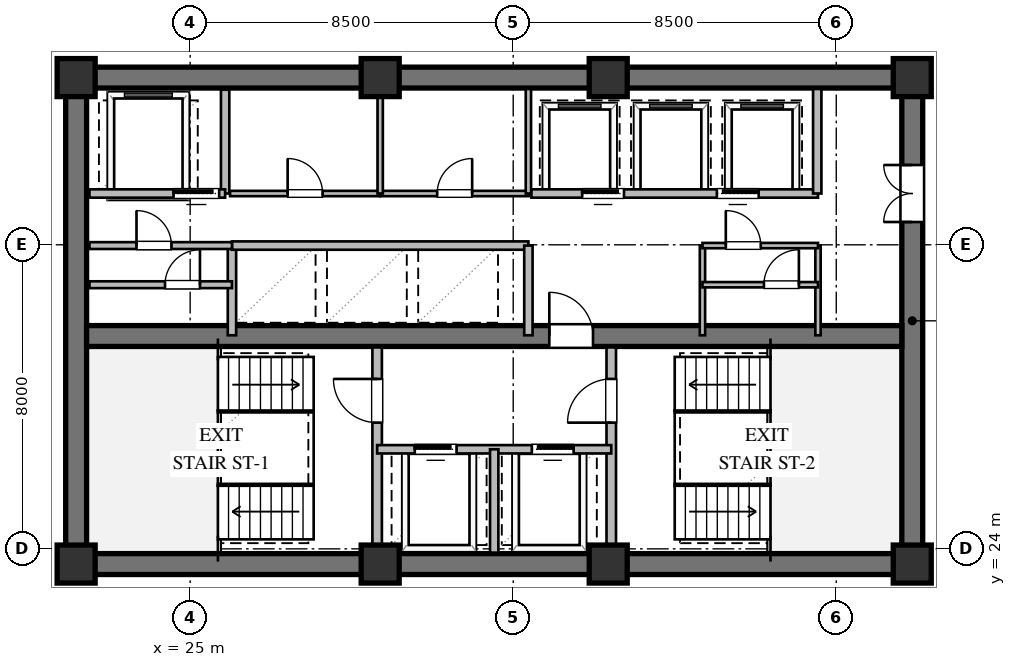
"""IFC4 building model, lengths in metres.
Left out: names, types, materials, properties, quantities, classifications, styles, units other than length and angle.
Written with IfcOpenShell. Run it as: python <this file> out.ifc"""

import sys

from ifc_helpers import new_model, si_unit, direction, frame, frame_2d, origin, origin_2d, place, context, subcontext, project, spatial, rectangle, extrude, element, fill, save


model = new_model("IFC4")
c1 = context("Model", 3, precision=1e-05, world=origin(), true_north=direction((0.0, 1.0)))
c2 = subcontext(c1, "Body", "Model", "MODEL_VIEW")
j1 = project(units=[si_unit("LENGTHUNIT", "METRE"), si_unit("PLANEANGLEUNIT", "RADIAN")], contexts=[c1])
p1 = place(None, origin())
s1 = spatial("IfcSite", under=j1, at=p1, CompositionType="ELEMENT")
p2 = place(p1, origin())
s2 = spatial("IfcBuilding", under=s1, at=p2, CompositionType="ELEMENT")
p3 = place(p2, frame((0.0, 0.0, 178.2)))
s3 = spatial("IfcBuildingStorey", under=s2, at=p3, CompositionType="ELEMENT", Elevation=178.2)
for number, where, z_axis, x_axis in (
    (1, (21.725, 23.6, 0.0), (0.0, 0.0, 1.0), (1.0, 0.0, 0.0)),
    (2, (21.725, 36.4, 0.0), (0.0, 0.0, 1.0), (1.0, 0.0, 0.0)),
):
    element("IfcWall", number, at=place(p3, frame(where, z_axis=z_axis, x_axis=x_axis)), inside=s3, PredefinedType="SHEAR", context=c2, shape_type="SweptSolid", body=[
        extrude(rectangle(XDim=22.55, YDim=0.55, at=frame_2d((11.275, 0.0))), origin(), (0.0, 0.0, 1.0), 3.28),
    ])
p4 = place(p3, frame((22.0, 23.875, 0.0), z_axis=(0.0, 0.0, 1.0), x_axis=(0.0, 1.0, 0.0)))
e3 = element("IfcWall", 3, at=p4, inside=s3, PredefinedType="SHEAR", context=c2, shape_type="SweptSolid", body=[
    extrude(rectangle(XDim=12.25, YDim=0.55, at=frame_2d((6.125, 0.0))), origin(), (0.0, 0.0, 1.0), 3.28),
])
p5 = place(p3, frame((44.0, 23.875, 0.0), z_axis=(0.0, 0.0, 1.0), x_axis=(0.0, 1.0, 0.0)))
e4 = element("IfcWall", 4, at=p5, inside=s3, PredefinedType="SHEAR", context=c2, shape_type="SweptSolid", body=[
    extrude(rectangle(XDim=12.25, YDim=0.55, at=frame_2d((6.125, 0.0))), origin(), (0.0, 0.0, 1.0), 3.28),
])
p6 = place(p5, frame((8.725, 0.0, 0.0)))
e5 = element("IfcOpeningElement", 5, at=p6, cuts=e4, PredefinedType="OPENING", context=c2, shape_type="SweptSolid", body=[
    extrude(rectangle(XDim=1.5, YDim=2.15, at=frame_2d((0.75, 1.075))), frame((0.0, 0.285, 0.0), z_axis=(0.0, -1.0, 0.0), x_axis=(1.0, 0.0, 0.0)), (0.0, 0.0, 1.0), 0.57),
])
p7 = place(p3, frame((22.275, 29.6, 0.0), z_axis=(0.0, 0.0, 1.0), x_axis=(1.0, 0.0, 0.0)))
e6 = element("IfcWall", 6, at=p7, inside=s3, PredefinedType="SHEAR", context=c2, shape_type="SweptSolid", body=[
    extrude(rectangle(XDim=21.45, YDim=0.55, at=frame_2d((10.725, 0.0))), origin(), (0.0, 0.0, 1.0), 3.28),
])
p8 = place(p7, frame((12.175, 0.0, 0.0)))
e7 = element("IfcOpeningElement", 7, at=p8, cuts=e6, PredefinedType="OPENING", context=c2, shape_type="SweptSolid", body=[
    extrude(rectangle(XDim=1.15, YDim=2.1, at=frame_2d((0.575, 1.05))), frame((0.0, 0.285, 0.0), z_axis=(0.0, -1.0, 0.0), x_axis=(1.0, 0.0, 0.0)), (0.0, 0.0, 1.0), 0.57),
])
for number, where, z_axis, x_axis in (
    (8, (22.0, 23.6, 0.0), (0.0, 0.0, 1.0), (1.0, 0.0, 0.0)),
    (9, (30.0, 23.6, 0.0), (0.0, 0.0, 1.0), (1.0, 0.0, 0.0)),
    (10, (36.0, 23.6, 0.0), (0.0, 0.0, 1.0), (1.0, 0.0, 0.0)),
    (11, (44.0, 23.6, 0.0), (0.0, 0.0, 1.0), (1.0, 0.0, 0.0)),
    (12, (44.0, 36.4, 0.0), (0.0, 0.0, 1.0), (1.0, 0.0, 0.0)),
    (13, (36.0, 36.4, 0.0), (0.0, 0.0, 1.0), (1.0, 0.0, 0.0)),
    (14, (30.0, 36.4, 0.0), (0.0, 0.0, 1.0), (1.0, 0.0, 0.0)),
    (15, (22.0, 36.4, 0.0), (0.0, 0.0, 1.0), (1.0, 0.0, 0.0)),
):
    element("IfcColumn", number, at=place(p3, frame(where, z_axis=z_axis, x_axis=x_axis)), inside=s3, PredefinedType="COLUMN", context=c2, shape_type="SweptSolid", body=[
        extrude(rectangle(XDim=1.0, YDim=1.0, at=origin_2d()), origin(), (0.0, 0.0, 1.0), 3.6),
    ])
p9 = place(p3, frame((29.92, 23.9, 0.0), z_axis=(0.0, 0.0, 1.0), x_axis=(0.0, 1.0, 0.0)))
e16 = element("IfcWall", 16, at=p9, inside=s3, PredefinedType="SOLIDWALL", context=c2, shape_type="SweptSolid", body=[
    extrude(rectangle(XDim=5.4, YDim=0.25, at=frame_2d((2.7, 0.0))), origin(), (0.0, 0.0, 1.0), 2.81),
])
p10 = place(p9, frame((3.421, 0.0, 0.0)))
e17 = element("IfcOpeningElement", 17, at=p10, cuts=e16, PredefinedType="OPENING", context=c2, shape_type="SweptSolid", body=[
    extrude(rectangle(XDim=1.15, YDim=2.1, at=frame_2d((0.575, 1.05))), frame((0.0, 0.135, 0.0), z_axis=(0.0, -1.0, 0.0), x_axis=(1.0, 0.0, 0.0)), (0.0, 0.0, 1.0), 0.27),
])
p11 = place(p3, frame((36.08, 23.9, 0.0), z_axis=(0.0, 0.0, 1.0), x_axis=(0.0, 1.0, 0.0)))
e18 = element("IfcWall", 18, at=p11, inside=s3, PredefinedType="SOLIDWALL", context=c2, shape_type="SweptSolid", body=[
    extrude(rectangle(XDim=5.4, YDim=0.25, at=frame_2d((2.7, 0.0))), origin(), (0.0, 0.0, 1.0), 3.28),
])
p12 = place(p11, frame((3.421, 0.0, 0.0)))
e19 = element("IfcOpeningElement", 19, at=p12, cuts=e18, PredefinedType="OPENING", context=c2, shape_type="SweptSolid", body=[
    extrude(rectangle(XDim=1.15, YDim=2.1, at=frame_2d((0.575, 1.05))), frame((0.0, 0.135, 0.0), z_axis=(0.0, -1.0, 0.0), x_axis=(1.0, 0.0, 0.0)), (0.0, 0.0, 1.0), 0.27),
])
p13 = place(p3, frame((29.92, 26.62, 0.0), z_axis=(0.0, 0.0, 1.0), x_axis=(1.0, 0.0, 0.0)))
e20 = element("IfcWall", 20, at=p13, inside=s3, PredefinedType="SOLIDWALL", context=c2, shape_type="SweptSolid", body=[
    extrude(rectangle(XDim=6.16, YDim=0.22, at=frame_2d((3.08, 0.0))), origin(), (0.0, 0.0, 1.0), 3.28),
])
p14 = place(p13, frame((0.99, 0.0, 0.0)))
e21 = element("IfcOpeningElement", 21, at=p14, cuts=e20, PredefinedType="OPENING", context=c2, shape_type="SweptSolid", body=[
    extrude(rectangle(XDim=1.1, YDim=2.1, at=frame_2d((0.55, 1.05))), frame((0.0, 0.12, 0.0), z_axis=(0.0, -1.0, 0.0), x_axis=(1.0, 0.0, 0.0)), (0.0, 0.0, 1.0), 0.24),
])
p15 = place(p13, frame((4.07, 0.0, 0.0)))
e22 = element("IfcOpeningElement", 22, at=p15, cuts=e20, PredefinedType="OPENING", context=c2, shape_type="SweptSolid", body=[
    extrude(rectangle(XDim=1.1, YDim=2.1, at=frame_2d((0.55, 1.05))), frame((0.0, 0.12, 0.0), z_axis=(0.0, -1.0, 0.0), x_axis=(1.0, 0.0, 0.0)), (0.0, 0.0, 1.0), 0.24),
])
p16 = place(p3, frame((33.0, 23.9, 0.0), z_axis=(0.0, 0.0, 1.0), x_axis=(0.0, 1.0, 0.0)))
e23 = element("IfcWall", 23, at=p16, inside=s3, PredefinedType="SOLIDWALL", context=c2, shape_type="SweptSolid", body=[
    extrude(rectangle(XDim=2.72, YDim=0.22, at=frame_2d((1.36, 0.0))), origin(), (0.0, 0.0, 1.0), 3.28),
])
p17 = place(p3, frame((25.92, 33.35, 0.0), z_axis=(0.0, 0.0, 1.0), x_axis=(0.0, 1.0, 0.0)))
e24 = element("IfcWall", 24, at=p17, inside=s3, PredefinedType="SOLIDWALL", context=c2, shape_type="SweptSolid", body=[
    extrude(rectangle(XDim=2.73, YDim=0.22, at=frame_2d((1.365, 0.0))), origin(), (0.0, 0.0, 1.0), 3.28),
])
p18 = place(p3, frame((22.35, 33.35, 0.0), z_axis=(0.0, 0.0, 1.0), x_axis=(1.0, 0.0, 0.0)))
e25 = element("IfcWall", 25, at=p18, inside=s3, PredefinedType="SOLIDWALL", context=c2, shape_type="SweptSolid", body=[
    extrude(rectangle(XDim=3.57, YDim=0.22, at=frame_2d((1.785, 0.0))), origin(), (0.0, 0.0, 1.0), 3.28),
])
p19 = place(p18, frame((2.213, 0.0, 0.0)))
e26 = element("IfcOpeningElement", 26, at=p19, cuts=e25, PredefinedType="OPENING", context=c2, shape_type="SweptSolid", body=[
    extrude(rectangle(XDim=1.2, YDim=2.1, at=frame_2d((0.6, 1.05))), frame((0.0, 0.12, 0.0), z_axis=(0.0, -1.0, 0.0), x_axis=(1.0, 0.0, 0.0)), (0.0, 0.0, 1.0), 0.24),
])
p20 = place(p3, frame((26.1, 29.62, 0.0), z_axis=(0.0, 0.0, 1.0), x_axis=(0.0, 1.0, 0.0)))
e27 = element("IfcWall", 27, at=p20, inside=s3, PredefinedType="SOLIDWALL", context=c2, shape_type="SweptSolid", body=[
    extrude(rectangle(XDim=2.36, YDim=0.22, at=frame_2d((1.18, 0.0))), origin(), (0.0, 0.0, 1.0), 3.28),
])
p21 = place(p3, frame((26.1, 31.98, 0.0), z_axis=(0.0, 0.0, 1.0), x_axis=(1.0, 0.0, 0.0)))
e28 = element("IfcWall", 28, at=p21, inside=s3, PredefinedType="SOLIDWALL", context=c2, shape_type="SweptSolid", body=[
    extrude(rectangle(XDim=7.8, YDim=0.22, at=frame_2d((3.9, 0.0))), origin(), (0.0, 0.0, 1.0), 3.28),
])
p22 = place(p3, frame((33.9, 29.62, 0.0), z_axis=(0.0, 0.0, 1.0), x_axis=(0.0, 1.0, 0.0)))
e29 = element("IfcWall", 29, at=p22, inside=s3, PredefinedType="SOLIDWALL", context=c2, shape_type="SweptSolid", body=[
    extrude(rectangle(XDim=2.36, YDim=0.22, at=frame_2d((1.18, 0.0))), origin(), (0.0, 0.0, 1.0), 3.28),
])
p23 = place(p3, frame((26.05, 33.35, 0.0), z_axis=(0.0, 0.0, 1.0), x_axis=(1.0, 0.0, 0.0)))
e30 = element("IfcWall", 30, at=p23, inside=s3, PredefinedType="PARTITIONING", context=c2, shape_type="SweptSolid", body=[
    extrude(rectangle(XDim=3.95, YDim=0.14, at=frame_2d((1.975, 0.0))), origin(), (0.0, 0.0, 1.0), 3.28),
])
p24 = place(p23, frame((1.515, 0.0, 0.0)))
e31 = element("IfcOpeningElement", 31, at=p24, cuts=e30, PredefinedType="OPENING", context=c2, shape_type="SweptSolid", body=[
    extrude(rectangle(XDim=0.92, YDim=2.1, at=frame_2d((0.46, 1.05))), frame((0.0, 0.08, 0.0), z_axis=(0.0, -1.0, 0.0), x_axis=(1.0, 0.0, 0.0)), (0.0, 0.0, 1.0), 0.16),
])
p25 = place(p3, frame((30.0, 33.35, 0.0), z_axis=(0.0, 0.0, 1.0), x_axis=(1.0, 0.0, 0.0)))
e32 = element("IfcWall", 32, at=p25, inside=s3, PredefinedType="PARTITIONING", context=c2, shape_type="SweptSolid", body=[
    extrude(rectangle(XDim=3.92, YDim=0.14, at=frame_2d((1.96, 0.0))), origin(), (0.0, 0.0, 1.0), 3.28),
])
p26 = place(p25, frame((1.5, 0.0, 0.0)))
e33 = element("IfcOpeningElement", 33, at=p26, cuts=e32, PredefinedType="OPENING", context=c2, shape_type="SweptSolid", body=[
    extrude(rectangle(XDim=0.92, YDim=2.1, at=frame_2d((0.46, 1.05))), frame((0.0, 0.08, 0.0), z_axis=(0.0, -1.0, 0.0), x_axis=(1.0, 0.0, 0.0)), (0.0, 0.0, 1.0), 0.16),
])
for number, where, z_axis, x_axis in (
    (34, (30.0, 33.35, 0.0), (0.0, 0.0, 1.0), (0.0, 1.0, 0.0)),
    (35, (33.9, 33.35, 0.0), (0.0, 0.0, 1.0), (0.0, 1.0, 0.0)),
):
    element("IfcWall", number, at=place(p3, frame(where, z_axis=z_axis, x_axis=x_axis)), inside=s3, PredefinedType="PARTITIONING", context=c2, shape_type="SweptSolid", body=[
        extrude(rectangle(XDim=2.75, YDim=0.14, at=frame_2d((1.375, 0.0))), origin(), (0.0, 0.0, 1.0), 3.28),
    ])
p27 = place(p3, frame((33.98, 33.35, 0.0), z_axis=(0.0, 0.0, 1.0), x_axis=(1.0, 0.0, 0.0)))
e36 = element("IfcWall", 36, at=p27, inside=s3, PredefinedType="SOLIDWALL", context=c2, shape_type="SweptSolid", body=[
    extrude(rectangle(XDim=7.54, YDim=0.22, at=frame_2d((3.77, 0.0))), origin(), (0.0, 0.0, 1.0), 3.28),
])
p28 = place(p27, frame((1.335, 0.0, 0.0)))
e37 = element("IfcOpeningElement", 37, at=p28, cuts=e36, PredefinedType="OPENING", context=c2, shape_type="SweptSolid", body=[
    extrude(rectangle(XDim=1.1, YDim=2.1, at=frame_2d((0.55, 1.05))), frame((0.0, 0.12, 0.0), z_axis=(0.0, -1.0, 0.0), x_axis=(1.0, 0.0, 0.0)), (0.0, 0.0, 1.0), 0.24),
])
p29 = place(p27, frame((4.879, 0.0, 0.0)))
e38 = element("IfcOpeningElement", 38, at=p29, cuts=e36, PredefinedType="OPENING", context=c2, shape_type="SweptSolid", body=[
    extrude(rectangle(XDim=1.1, YDim=2.1, at=frame_2d((0.55, 1.05))), frame((0.0, 0.12, 0.0), z_axis=(0.0, -1.0, 0.0), x_axis=(1.0, 0.0, 0.0)), (0.0, 0.0, 1.0), 0.24),
])
p30 = place(p3, frame((41.5, 33.35, 0.0), z_axis=(0.0, 0.0, 1.0), x_axis=(0.0, 1.0, 0.0)))
e39 = element("IfcWall", 39, at=p30, inside=s3, PredefinedType="SOLIDWALL", context=c2, shape_type="SweptSolid", body=[
    extrude(rectangle(XDim=2.75, YDim=0.22, at=frame_2d((1.375, 0.0))), origin(), (0.0, 0.0, 1.0), 3.28),
])
p31 = place(p3, frame((22.35, 30.95, 0.0), z_axis=(0.0, 0.0, 1.0), x_axis=(1.0, 0.0, 0.0)))
e40 = element("IfcWall", 40, at=p31, inside=s3, PredefinedType="PARTITIONING", context=c2, shape_type="SweptSolid", body=[
    extrude(rectangle(XDim=3.75, YDim=0.18, at=frame_2d((1.875, 0.0))), origin(), (0.0, 0.0, 1.0), 3.28),
])
p32 = place(p31, frame((1.988, 0.0, 0.0)))
e41 = element("IfcOpeningElement", 41, at=p32, cuts=e40, PredefinedType="OPENING", context=c2, shape_type="SweptSolid", body=[
    extrude(rectangle(XDim=0.92, YDim=2.1, at=frame_2d((0.46, 1.05))), frame((0.0, 0.1, 0.0), z_axis=(0.0, -1.0, 0.0), x_axis=(1.0, 0.0, 0.0)), (0.0, 0.0, 1.0), 0.2),
])
p33 = place(p3, frame((22.35, 31.98, 0.0), z_axis=(0.0, 0.0, 1.0), x_axis=(1.0, 0.0, 0.0)))
e42 = element("IfcWall", 42, at=p33, inside=s3, PredefinedType="PARTITIONING", context=c2, shape_type="SweptSolid", body=[
    extrude(rectangle(XDim=3.75, YDim=0.18, at=frame_2d((1.875, 0.0))), origin(), (0.0, 0.0, 1.0), 3.28),
])
p34 = place(p33, frame((1.238, 0.0, 0.0)))
e43 = element("IfcOpeningElement", 43, at=p34, cuts=e42, PredefinedType="OPENING", context=c2, shape_type="SweptSolid", body=[
    extrude(rectangle(XDim=0.92, YDim=2.1, at=frame_2d((0.46, 1.05))), frame((0.0, 0.1, 0.0), z_axis=(0.0, -1.0, 0.0), x_axis=(1.0, 0.0, 0.0)), (0.0, 0.0, 1.0), 0.2),
])
for number, where, z_axis, x_axis in (
    (44, (38.48, 29.62, 0.0), (0.0, 0.0, 1.0), (0.0, 1.0, 0.0)),
    (45, (41.52, 29.62, 0.0), (0.0, 0.0, 1.0), (0.0, 1.0, 0.0)),
):
    element("IfcWall", number, at=place(p3, frame(where, z_axis=z_axis, x_axis=x_axis)), inside=s3, PredefinedType="PARTITIONING", context=c2, shape_type="SweptSolid", body=[
        extrude(rectangle(XDim=2.36, YDim=0.14, at=frame_2d((1.18, 0.0))), origin(), (0.0, 0.0, 1.0), 3.28),
    ])
p35 = place(p3, frame((38.48, 30.95, 0.0), z_axis=(0.0, 0.0, 1.0), x_axis=(1.0, 0.0, 0.0)))
e46 = element("IfcWall", 46, at=p35, inside=s3, PredefinedType="PARTITIONING", context=c2, shape_type="SweptSolid", body=[
    extrude(rectangle(XDim=3.04, YDim=0.14, at=frame_2d((1.52, 0.0))), origin(), (0.0, 0.0, 1.0), 3.28),
])
p36 = place(p35, frame((1.617, 0.0, 0.0)))
e47 = element("IfcOpeningElement", 47, at=p36, cuts=e46, PredefinedType="OPENING", context=c2, shape_type="SweptSolid", body=[
    extrude(rectangle(XDim=0.92, YDim=2.1, at=frame_2d((0.46, 1.05))), frame((0.0, 0.08, 0.0), z_axis=(0.0, -1.0, 0.0), x_axis=(1.0, 0.0, 0.0)), (0.0, 0.0, 1.0), 0.16),
])
p37 = place(p3, frame((38.48, 31.98, 0.0), z_axis=(0.0, 0.0, 1.0), x_axis=(1.0, 0.0, 0.0)))
e48 = element("IfcWall", 48, at=p37, inside=s3, PredefinedType="PARTITIONING", context=c2, shape_type="SweptSolid", body=[
    extrude(rectangle(XDim=3.04, YDim=0.14, at=frame_2d((1.52, 0.0))), origin(), (0.0, 0.0, 1.0), 3.28),
])
p38 = place(p37, frame((0.614, 0.0, 0.0)))
e49 = element("IfcOpeningElement", 49, at=p38, cuts=e48, PredefinedType="OPENING", context=c2, shape_type="SweptSolid", body=[
    extrude(rectangle(XDim=0.92, YDim=2.1, at=frame_2d((0.46, 1.05))), frame((0.0, 0.08, 0.0), z_axis=(0.0, -1.0, 0.0), x_axis=(1.0, 0.0, 0.0)), (0.0, 0.0, 1.0), 0.16),
])
p39 = place(p10, origin())
e50 = element("IfcDoor", 50, at=p39, inside=s3, OperationType="SINGLE_SWING_RIGHT", PredefinedType="DOOR", context=c2, shape_type="SweptSolid", body=[
    extrude(rectangle(XDim=1.15, YDim=2.1, at=frame_2d((0.575, 1.05))), frame((0.0, 0.025, 0.0), z_axis=(0.0, -1.0, 0.0), x_axis=(1.0, 0.0, 0.0)), (0.0, 0.0, 1.0), 0.05),
])
fill(e17, e50)
p40 = place(p12, origin())
e51 = element("IfcDoor", 51, at=p40, inside=s3, OperationType="SINGLE_SWING_LEFT", PredefinedType="DOOR", context=c2, shape_type="SweptSolid", body=[
    extrude(rectangle(XDim=1.15, YDim=2.1, at=frame_2d((0.575, 1.05))), frame((0.0, 0.025, 0.0), z_axis=(0.0, -1.0, 0.0), x_axis=(1.0, 0.0, 0.0)), (0.0, 0.0, 1.0), 0.05),
])
fill(e19, e51)
p41 = place(p14, origin())
e52 = element("IfcDoor", 52, at=p41, inside=s3, OperationType="SLIDING_TO_LEFT", PredefinedType="DOOR", context=c2, shape_type="SweptSolid", body=[
    extrude(rectangle(XDim=1.1, YDim=2.1, at=frame_2d((0.55, 1.05))), frame((0.0, 0.025, 0.0), z_axis=(0.0, -1.0, 0.0), x_axis=(1.0, 0.0, 0.0)), (0.0, 0.0, 1.0), 0.05),
])
fill(e21, e52)
p42 = place(p15, origin())
e53 = element("IfcDoor", 53, at=p42, inside=s3, OperationType="SLIDING_TO_RIGHT", PredefinedType="DOOR", context=c2, shape_type="SweptSolid", body=[
    extrude(rectangle(XDim=1.1, YDim=2.1, at=frame_2d((0.55, 1.05))), frame((0.0, 0.025, 0.0), z_axis=(0.0, -1.0, 0.0), x_axis=(1.0, 0.0, 0.0)), (0.0, 0.0, 1.0), 0.05),
])
fill(e22, e53)
p43 = place(p8, origin())
e54 = element("IfcDoor", 54, at=p43, inside=s3, OperationType="SINGLE_SWING_LEFT", PredefinedType="DOOR", context=c2, shape_type="SweptSolid", body=[
    extrude(rectangle(XDim=1.15, YDim=2.1, at=frame_2d((0.575, 1.05))), frame((0.0, 0.025, 0.0), z_axis=(0.0, -1.0, 0.0), x_axis=(1.0, 0.0, 0.0)), (0.0, 0.0, 1.0), 0.05),
])
fill(e7, e54)
p44 = place(p6, origin())
e55 = element("IfcDoor", 55, at=p44, inside=s3, OperationType="DOUBLE_DOOR_SINGLE_SWING", PredefinedType="DOOR", context=c2, shape_type="SweptSolid", body=[
    extrude(rectangle(XDim=1.5, YDim=2.15, at=frame_2d((0.75, 1.075))), frame((0.0, 0.025, 0.0), z_axis=(0.0, -1.0, 0.0), x_axis=(1.0, 0.0, 0.0)), (0.0, 0.0, 1.0), 0.05),
])
fill(e5, e55)
p45 = place(p19, origin())
e56 = element("IfcDoor", 56, at=p45, inside=s3, OperationType="SLIDING_TO_LEFT", PredefinedType="DOOR", context=c2, shape_type="SweptSolid", body=[
    extrude(rectangle(XDim=1.2, YDim=2.1, at=frame_2d((0.6, 1.05))), frame((0.0, 0.025, 0.0), z_axis=(0.0, -1.0, 0.0), x_axis=(1.0, 0.0, 0.0)), (0.0, 0.0, 1.0), 0.05),
])
fill(e26, e56)
p46 = place(p24, origin())
e57 = element("IfcDoor", 57, at=p46, inside=s3, OperationType="SINGLE_SWING_LEFT", PredefinedType="DOOR", context=c2, shape_type="SweptSolid", body=[
    extrude(rectangle(XDim=0.92, YDim=2.1, at=frame_2d((0.46, 1.05))), frame((0.0, 0.025, 0.0), z_axis=(0.0, -1.0, 0.0), x_axis=(1.0, 0.0, 0.0)), (0.0, 0.0, 1.0), 0.05),
])
fill(e31, e57)
p47 = place(p26, origin())
e58 = element("IfcDoor", 58, at=p47, inside=s3, OperationType="SINGLE_SWING_RIGHT", PredefinedType="DOOR", context=c2, shape_type="SweptSolid", body=[
    extrude(rectangle(XDim=0.92, YDim=2.1, at=frame_2d((0.46, 1.05))), frame((0.0, 0.025, 0.0), z_axis=(0.0, -1.0, 0.0), x_axis=(1.0, 0.0, 0.0)), (0.0, 0.0, 1.0), 0.05),
])
fill(e33, e58)
p48 = place(p28, origin())
e59 = element("IfcDoor", 59, at=p48, inside=s3, OperationType="SLIDING_TO_LEFT", PredefinedType="DOOR", context=c2, shape_type="SweptSolid", body=[
    extrude(rectangle(XDim=1.1, YDim=2.1, at=frame_2d((0.55, 1.05))), frame((0.0, 0.025, 0.0), z_axis=(0.0, -1.0, 0.0), x_axis=(1.0, 0.0, 0.0)), (0.0, 0.0, 1.0), 0.05),
])
fill(e37, e59)
p49 = place(p29, origin())
e60 = element("IfcDoor", 60, at=p49, inside=s3, OperationType="SLIDING_TO_RIGHT", PredefinedType="DOOR", context=c2, shape_type="SweptSolid", body=[
    extrude(rectangle(XDim=1.1, YDim=2.1, at=frame_2d((0.55, 1.05))), frame((0.0, 0.025, 0.0), z_axis=(0.0, -1.0, 0.0), x_axis=(1.0, 0.0, 0.0)), (0.0, 0.0, 1.0), 0.05),
])
fill(e38, e60)
p50 = place(p34, origin())
e61 = element("IfcDoor", 61, at=p50, inside=s3, OperationType="SINGLE_SWING_LEFT", PredefinedType="DOOR", context=c2, shape_type="SweptSolid", body=[
    extrude(rectangle(XDim=0.92, YDim=2.1, at=frame_2d((0.46, 1.05))), frame((0.0, 0.025, 0.0), z_axis=(0.0, -1.0, 0.0), x_axis=(1.0, 0.0, 0.0)), (0.0, 0.0, 1.0), 0.05),
])
fill(e43, e61)
p51 = place(p32, origin())
e62 = element("IfcDoor", 62, at=p51, inside=s3, OperationType="SINGLE_SWING_RIGHT", PredefinedType="DOOR", context=c2, shape_type="SweptSolid", body=[
    extrude(rectangle(XDim=0.92, YDim=2.1, at=frame_2d((0.46, 1.05))), frame((0.0, 0.025, 0.0), z_axis=(0.0, -1.0, 0.0), x_axis=(1.0, 0.0, 0.0)), (0.0, 0.0, 1.0), 0.05),
])
fill(e41, e62)
p52 = place(p38, origin())
e63 = element("IfcDoor", 63, at=p52, inside=s3, OperationType="SINGLE_SWING_LEFT", PredefinedType="DOOR", context=c2, shape_type="SweptSolid", body=[
    extrude(rectangle(XDim=0.92, YDim=2.1, at=frame_2d((0.46, 1.05))), frame((0.0, 0.025, 0.0), z_axis=(0.0, -1.0, 0.0), x_axis=(1.0, 0.0, 0.0)), (0.0, 0.0, 1.0), 0.05),
])
fill(e49, e63)
p53 = place(p36, origin())
e64 = element("IfcDoor", 64, at=p53, inside=s3, OperationType="SINGLE_SWING_RIGHT", PredefinedType="DOOR", context=c2, shape_type="SweptSolid", body=[
    extrude(rectangle(XDim=0.92, YDim=2.1, at=frame_2d((0.46, 1.05))), frame((0.0, 0.025, 0.0), z_axis=(0.0, -1.0, 0.0), x_axis=(1.0, 0.0, 0.0)), (0.0, 0.0, 1.0), 0.05),
])
fill(e47, e64)
save(model, sys.argv[1])
